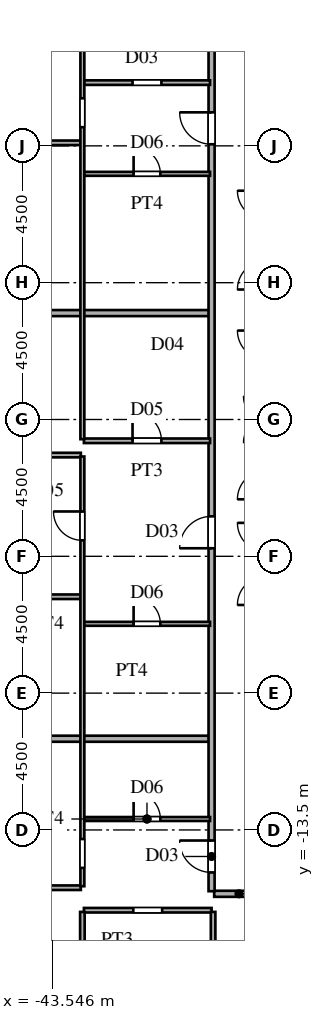
"""IFC4 building model, lengths in metres.
Left out: names, types, materials, properties, quantities, classifications, styles, units other than length and angle.
Written with IfcOpenShell. Run it as: python <this file> out.ifc"""

import sys

from ifc_helpers import new_model, si_unit, direction, frame, frame_2d, origin, place, context, subcontext, project, spatial, rectangle, extrude, source, transform, mapped, element, fill, save


model = new_model("IFC4")
c1 = context("Model", 3, precision=1e-05, world=origin(), true_north=direction((0.0, 1.0)))
c2 = subcontext(c1, "Body", "Model", "MODEL_VIEW")
j1 = project(units=[si_unit("LENGTHUNIT", "METRE"), si_unit("PLANEANGLEUNIT", "RADIAN")], contexts=[c1])
p1 = place(None, origin())
s1 = spatial("IfcSite", under=j1, at=p1, CompositionType="ELEMENT")
p2 = place(p1, origin())
s2 = spatial("IfcBuilding", under=s1, at=p2, CompositionType="ELEMENT")
p3 = place(p2, frame((0.0, 0.0, 103.2)))
s3 = spatial("IfcBuildingStorey", under=s2, at=p3, CompositionType="ELEMENT", Elevation=103.2)
p4 = place(p3, frame((-42.5, -16.14, 0.0), z_axis=(0.0, 0.0, 1.0), x_axis=(1.0, 0.0, 0.0)))
e1 = element("IfcWall", 1, at=p4, inside=s3, PredefinedType="PARTITIONING", context=c2, shape_type="SweptSolid", body=[
    extrude(rectangle(XDim=4.2, YDim=0.15, at=frame_2d((2.1, 0.0))), origin(), (0.0, 0.0, 1.0), 3.38),
])
p5 = place(p4, frame((1.625, 0.0, 0.0)))
e2 = element("IfcOpeningElement", 2, at=p5, cuts=e1, PredefinedType="OPENING", context=c2, shape_type="SweptSolid", body=[
    extrude(rectangle(XDim=0.95, YDim=2.15, at=frame_2d((0.475, 1.075))), frame((0.0, 0.085, 0.0), z_axis=(0.0, -1.0, 0.0), x_axis=(1.0, 0.0, 0.0)), (0.0, 0.0, 1.0), 0.17),
])
p6 = place(p3, frame((-38.215, -15.6, 0.0), z_axis=(0.0, 0.0, 1.0), x_axis=(1.0, 0.0, 0.0)))
e3 = element("IfcWall", 3, at=p6, inside=s3, PredefinedType="PARTITIONING", context=c2, shape_type="SweptSolid", body=[
    extrude(rectangle(XDim=1.63, YDim=0.2, at=frame_2d((0.815, 0.0))), origin(), (0.0, 0.0, 1.0), 3.38),
])
p7 = place(p3, frame((-53.477, -15.4, 0.0), z_axis=(0.0, 0.0, 1.0), x_axis=(1.0, 0.0, 0.0)))
e4 = element("IfcWall", 4, at=p7, inside=s3, PredefinedType="PARTITIONING", context=c2, shape_type="SweptSolid", body=[
    extrude(rectangle(XDim=10.877, YDim=0.15, at=frame_2d((5.438, 0.0))), origin(), (0.0, 0.0, 1.0), 3.38),
])
p8 = place(p7, frame((7.465, 0.0, 0.0)))
e5 = element("IfcOpeningElement", 5, at=p8, cuts=e4, PredefinedType="OPENING", context=c2, shape_type="SweptSolid", body=[
    extrude(rectangle(XDim=0.95, YDim=2.15, at=frame_2d((0.475, 1.075))), frame((0.0, 0.085, 0.0), z_axis=(0.0, -1.0, 0.0), x_axis=(1.0, 0.0, 0.0)), (0.0, 0.0, 1.0), 0.17),
])
p9 = place(p3, frame((-42.5, -13.14, 0.0), z_axis=(0.0, 0.0, 1.0), x_axis=(1.0, 0.0, 0.0)))
e6 = element("IfcWall", 6, at=p9, inside=s3, PredefinedType="PARTITIONING", context=c2, shape_type="SweptSolid", body=[
    extrude(rectangle(XDim=4.15, YDim=0.13, at=frame_2d((2.075, 0.0))), origin(), (0.0, 0.0, 1.0), 3.38),
])
p10 = place(p9, frame((1.635, 0.0, 0.0)))
e7 = element("IfcOpeningElement", 7, at=p10, cuts=e6, PredefinedType="OPENING", context=c2, shape_type="SweptSolid", body=[
    extrude(rectangle(XDim=0.88, YDim=2.1, at=frame_2d((0.44, 1.05))), frame((0.0, 0.075, 0.0), z_axis=(0.0, -1.0, 0.0), x_axis=(1.0, 0.0, 0.0)), (0.0, 0.0, 1.0), 0.15),
])
p11 = place(p3, frame((-64.346, -10.5, 0.0), z_axis=(0.0, 0.0, 1.0), x_axis=(1.0, 0.0, 0.0)))
e8 = element("IfcWall", 8, at=p11, inside=s3, PredefinedType="PARTITIONING", context=c2, shape_type="SweptSolid", body=[
    extrude(rectangle(XDim=25.966, YDim=0.2, at=frame_2d((12.983, 0.0))), origin(), (0.0, 0.0, 1.0), 3.38),
])
p12 = place(p3, frame((-42.5, -6.72, 0.0), z_axis=(0.0, 0.0, 1.0), x_axis=(1.0, 0.0, 0.0)))
e9 = element("IfcWall", 9, at=p12, inside=s3, PredefinedType="PARTITIONING", context=c2, shape_type="SweptSolid", body=[
    extrude(rectangle(XDim=4.15, YDim=0.13, at=frame_2d((2.075, 0.0))), origin(), (0.0, 0.0, 1.0), 3.38),
])
p13 = place(p12, frame((1.635, 0.0, 0.0)))
e10 = element("IfcOpeningElement", 10, at=p13, cuts=e9, PredefinedType="OPENING", context=c2, shape_type="SweptSolid", body=[
    extrude(rectangle(XDim=0.88, YDim=2.1, at=frame_2d((0.44, 1.05))), frame((0.0, 0.075, 0.0), z_axis=(0.0, -1.0, 0.0), x_axis=(1.0, 0.0, 0.0)), (0.0, 0.0, 1.0), 0.15),
])
p14 = place(p3, frame((-71.035, -5.83, 0.0), z_axis=(0.0, 0.0, 1.0), x_axis=(1.0, 0.0, 0.0)))
e11 = element("IfcWall", 11, at=p14, inside=s3, PredefinedType="PARTITIONING", context=c2, shape_type="SweptSolid", body=[
    extrude(rectangle(XDim=28.435, YDim=0.15, at=frame_2d((14.217, 0.0))), origin(), (0.0, 0.0, 1.0), 3.38),
])
p15 = place(p14, frame((22.035, 0.0, 0.0)))
e12 = element("IfcOpeningElement", 12, at=p15, cuts=e11, PredefinedType="OPENING", context=c2, shape_type="SweptSolid", body=[
    extrude(rectangle(XDim=0.95, YDim=2.15, at=frame_2d((0.475, 1.075))), frame((0.0, 0.085, 0.0), z_axis=(0.0, -1.0, 0.0), x_axis=(1.0, 0.0, 0.0)), (0.0, 0.0, 1.0), 0.17),
])
p16 = place(p14, frame((13.21, 0.0, 0.0)))
e13 = element("IfcOpeningElement", 13, at=p16, cuts=e11, PredefinedType="OPENING", context=c2, shape_type="SweptSolid", body=[
    extrude(rectangle(XDim=0.95, YDim=2.15, at=frame_2d((0.475, 1.075))), frame((0.0, 0.085, 0.0), z_axis=(0.0, -1.0, 0.0), x_axis=(1.0, 0.0, 0.0)), (0.0, 0.0, 1.0), 0.17),
])
p17 = place(p3, frame((-71.035, -1.17, 0.0), z_axis=(0.0, 0.0, 1.0), x_axis=(1.0, 0.0, 0.0)))
e14 = element("IfcWall", 14, at=p17, inside=s3, PredefinedType="PARTITIONING", context=c2, shape_type="SweptSolid", body=[
    extrude(rectangle(XDim=28.435, YDim=0.15, at=frame_2d((14.217, 0.0))), origin(), (0.0, 0.0, 1.0), 3.38),
])
p18 = place(p17, frame((22.035, 0.0, 0.0)))
e15 = element("IfcOpeningElement", 15, at=p18, cuts=e14, PredefinedType="OPENING", context=c2, shape_type="SweptSolid", body=[
    extrude(rectangle(XDim=0.95, YDim=2.15, at=frame_2d((0.475, 1.075))), frame((0.0, 0.085, 0.0), z_axis=(0.0, -1.0, 0.0), x_axis=(1.0, 0.0, 0.0)), (0.0, 0.0, 1.0), 0.17),
])
p19 = place(p17, frame((13.21, 0.0, 0.0)))
e16 = element("IfcOpeningElement", 16, at=p19, cuts=e14, PredefinedType="OPENING", context=c2, shape_type="SweptSolid", body=[
    extrude(rectangle(XDim=0.95, YDim=2.15, at=frame_2d((0.475, 1.075))), frame((0.0, 0.085, 0.0), z_axis=(0.0, -1.0, 0.0), x_axis=(1.0, 0.0, 0.0)), (0.0, 0.0, 1.0), 0.17),
])
p20 = place(p3, frame((-42.5, -0.7, 0.0), z_axis=(0.0, 0.0, 1.0), x_axis=(1.0, 0.0, 0.0)))
e17 = element("IfcWall", 17, at=p20, inside=s3, PredefinedType="PARTITIONING", context=c2, shape_type="SweptSolid", body=[
    extrude(rectangle(XDim=4.15, YDim=0.15, at=frame_2d((2.075, 0.0))), origin(), (0.0, 0.0, 1.0), 3.38),
])
p21 = place(p20, frame((1.6, 0.0, 0.0)))
e18 = element("IfcOpeningElement", 18, at=p21, cuts=e17, PredefinedType="OPENING", context=c2, shape_type="SweptSolid", body=[
    extrude(rectangle(XDim=0.95, YDim=2.15, at=frame_2d((0.475, 1.075))), frame((0.0, 0.085, 0.0), z_axis=(0.0, -1.0, 0.0), x_axis=(1.0, 0.0, 0.0)), (0.0, 0.0, 1.0), 0.17),
])
p22 = place(p3, frame((-71.005, 3.5, 0.0), z_axis=(0.0, 0.0, 1.0), x_axis=(1.0, 0.0, 0.0)))
e19 = element("IfcWall", 19, at=p22, inside=s3, PredefinedType="PARTITIONING", context=c2, shape_type="SweptSolid", body=[
    extrude(rectangle(XDim=32.625, YDim=0.2, at=frame_2d((16.312, 0.0))), origin(), (0.0, 0.0, 1.0), 3.38),
])
p23 = place(p3, frame((-42.5, 8.08, 0.0), z_axis=(0.0, 0.0, 1.0), x_axis=(1.0, 0.0, 0.0)))
e20 = element("IfcWall", 20, at=p23, inside=s3, PredefinedType="PARTITIONING", context=c2, shape_type="SweptSolid", body=[
    extrude(rectangle(XDim=4.15, YDim=0.13, at=frame_2d((2.075, 0.0))), origin(), (0.0, 0.0, 1.0), 3.38),
])
p24 = place(p23, frame((1.635, 0.0, 0.0)))
e21 = element("IfcOpeningElement", 21, at=p24, cuts=e20, PredefinedType="OPENING", context=c2, shape_type="SweptSolid", body=[
    extrude(rectangle(XDim=0.88, YDim=2.1, at=frame_2d((0.44, 1.05))), frame((0.0, 0.075, 0.0), z_axis=(0.0, -1.0, 0.0), x_axis=(1.0, 0.0, 0.0)), (0.0, 0.0, 1.0), 0.15),
])
p25 = place(p3, frame((-67.478, 9.1, 0.0), z_axis=(0.0, 0.0, 1.0), x_axis=(1.0, 0.0, 0.0)))
e22 = element("IfcWall", 22, at=p25, inside=s3, PredefinedType="PARTITIONING", context=c2, shape_type="SweptSolid", body=[
    extrude(rectangle(XDim=24.878, YDim=0.15, at=frame_2d((12.439, 0.0))), origin(), (0.0, 0.0, 1.0), 3.38),
])
p26 = place(p25, frame((21.466, 0.0, 0.0)))
e23 = element("IfcOpeningElement", 23, at=p26, cuts=e22, PredefinedType="OPENING", context=c2, shape_type="SweptSolid", body=[
    extrude(rectangle(XDim=0.95, YDim=2.15, at=frame_2d((0.475, 1.075))), frame((0.0, 0.085, 0.0), z_axis=(0.0, -1.0, 0.0), x_axis=(1.0, 0.0, 0.0)), (0.0, 0.0, 1.0), 0.17),
])
p27 = place(p3, frame((-42.5, 11.08, 0.0), z_axis=(0.0, 0.0, 1.0), x_axis=(1.0, 0.0, 0.0)))
e24 = element("IfcWall", 24, at=p27, inside=s3, PredefinedType="PARTITIONING", context=c2, shape_type="SweptSolid", body=[
    extrude(rectangle(XDim=4.15, YDim=0.15, at=frame_2d((2.075, 0.0))), origin(), (0.0, 0.0, 1.0), 3.38),
])
p28 = place(p27, frame((1.6, 0.0, 0.0)))
e25 = element("IfcOpeningElement", 25, at=p28, cuts=e24, PredefinedType="OPENING", context=c2, shape_type="SweptSolid", body=[
    extrude(rectangle(XDim=0.95, YDim=2.15, at=frame_2d((0.475, 1.075))), frame((0.0, 0.085, 0.0), z_axis=(0.0, -1.0, 0.0), x_axis=(1.0, 0.0, 0.0)), (0.0, 0.0, 1.0), 0.17),
])
p29 = place(p3, frame((-42.55, -20.337, 0.0), z_axis=(0.0, 0.0, 1.0), x_axis=(0.0, 1.0, 0.0)))
e26 = element("IfcWall", 26, at=p29, inside=s3, PredefinedType="PARTITIONING", context=c2, shape_type="SweptSolid", body=[
    extrude(rectangle(XDim=4.142, YDim=0.15, at=frame_2d((2.071, 0.0))), origin(), (0.0, 0.0, 1.0), 3.38),
])
p30 = place(p3, frame((-42.55, -15.351, 0.0), z_axis=(0.0, 0.0, 1.0), x_axis=(0.0, 1.0, 0.0)))
e27 = element("IfcWall", 27, at=p30, inside=s3, PredefinedType="PARTITIONING", context=c2, shape_type="SweptSolid", body=[
    extrude(rectangle(XDim=14.134, YDim=0.13, at=frame_2d((7.067, 0.0))), origin(), (0.0, 0.0, 1.0), 3.38),
])
p31 = place(p30, frame((0.603, 0.0, 0.0)))
e28 = element("IfcOpeningElement", 28, at=p31, cuts=e27, PredefinedType="OPENING", context=c2, shape_type="SweptSolid", body=[
    extrude(rectangle(XDim=0.95, YDim=2.15, at=frame_2d((0.475, 1.075))), frame((0.0, 0.075, 0.0), z_axis=(0.0, -1.0, 0.0), x_axis=(1.0, 0.0, 0.0)), (0.0, 0.0, 1.0), 0.15),
])
p32 = place(p30, frame((11.376, 0.0, 0.0)))
e29 = element("IfcOpeningElement", 29, at=p32, cuts=e27, PredefinedType="OPENING", context=c2, shape_type="SweptSolid", body=[
    extrude(rectangle(XDim=0.95, YDim=2.15, at=frame_2d((0.475, 1.075))), frame((0.0, 0.075, 0.0), z_axis=(0.0, -1.0, 0.0), x_axis=(1.0, 0.0, 0.0)), (0.0, 0.0, 1.0), 0.15),
])
p33 = place(p3, frame((-42.55, -0.648, 0.0), z_axis=(0.0, 0.0, 1.0), x_axis=(0.0, 1.0, 0.0)))
e30 = element("IfcWall", 30, at=p33, inside=s3, PredefinedType="PARTITIONING", context=c2, shape_type="SweptSolid", body=[
    extrude(rectangle(XDim=20.985, YDim=0.13, at=frame_2d((10.492, 0.0))), origin(), (0.0, 0.0, 1.0), 3.38),
])
p34 = place(p33, frame((10.262, 0.0, 0.0)))
e31 = element("IfcOpeningElement", 31, at=p34, cuts=e30, PredefinedType="OPENING", context=c2, shape_type="SweptSolid", body=[
    extrude(rectangle(XDim=0.95, YDim=2.15, at=frame_2d((0.475, 1.075))), frame((0.0, 0.075, 0.0), z_axis=(0.0, -1.0, 0.0), x_axis=(1.0, 0.0, 0.0)), (0.0, 0.0, 1.0), 0.15),
])
p35 = place(p33, frame((18.653, 0.0, 0.0)))
e32 = element("IfcOpeningElement", 32, at=p35, cuts=e30, PredefinedType="OPENING", context=c2, shape_type="SweptSolid", body=[
    extrude(rectangle(XDim=0.95, YDim=2.15, at=frame_2d((0.475, 1.075))), frame((0.0, 0.075, 0.0), z_axis=(0.0, -1.0, 0.0), x_axis=(1.0, 0.0, 0.0)), (0.0, 0.0, 1.0), 0.15),
])
p36 = place(p3, frame((-38.3, -15.515, 0.0), z_axis=(0.0, 0.0, 1.0), x_axis=(0.0, 1.0, 0.0)))
e33 = element("IfcWall", 33, at=p36, inside=s3, PredefinedType="PARTITIONING", context=c2, shape_type="SweptSolid", body=[
    extrude(rectangle(XDim=31.03, YDim=0.2, at=frame_2d((15.515, 0.0))), origin(), (0.0, 0.0, 1.0), 3.38),
])
p37 = place(p36, frame((0.617, 0.0, 0.0)))
e34 = element("IfcOpeningElement", 34, at=p37, cuts=e33, PredefinedType="OPENING", context=c2, shape_type="SweptSolid", body=[
    extrude(rectangle(XDim=1.05, YDim=2.25, at=frame_2d((0.525, 1.125))), frame((0.0, 0.11, 0.0), z_axis=(0.0, -1.0, 0.0), x_axis=(1.0, 0.0, 0.0)), (0.0, 0.0, 1.0), 0.22),
])
p38 = place(p36, frame((11.28, 0.0, 0.0)))
e35 = element("IfcOpeningElement", 35, at=p38, cuts=e33, PredefinedType="OPENING", context=c2, shape_type="SweptSolid", body=[
    extrude(rectangle(XDim=1.05, YDim=2.25, at=frame_2d((0.525, 1.125))), frame((0.0, 0.11, 0.0), z_axis=(0.0, -1.0, 0.0), x_axis=(1.0, 0.0, 0.0)), (0.0, 0.0, 1.0), 0.22),
])
p39 = place(p36, frame((24.567, 0.0, 0.0)))
e36 = element("IfcOpeningElement", 36, at=p39, cuts=e33, PredefinedType="OPENING", context=c2, shape_type="SweptSolid", body=[
    extrude(rectangle(XDim=1.05, YDim=2.25, at=frame_2d((0.525, 1.125))), frame((0.0, 0.11, 0.0), z_axis=(0.0, -1.0, 0.0), x_axis=(1.0, 0.0, 0.0)), (0.0, 0.0, 1.0), 0.22),
])
p40 = place(p3, frame((-38.25, -22.273, 0.0), z_axis=(0.0, 0.0, 1.0), x_axis=(0.0, 1.0, 0.0)))
e37 = element("IfcWall", 37, at=p40, inside=s3, PredefinedType="PARTITIONING", context=c2, shape_type="SweptSolid", body=[
    extrude(rectangle(XDim=6.078, YDim=0.15, at=frame_2d((3.039, 0.0))), origin(), (0.0, 0.0, 1.0), 3.38),
])
p41 = place(p40, frame((0.929, 0.0, 0.0)))
e38 = element("IfcOpeningElement", 38, at=p41, cuts=e37, PredefinedType="OPENING", context=c2, shape_type="SweptSolid", body=[
    extrude(rectangle(XDim=0.95, YDim=2.15, at=frame_2d((0.475, 1.075))), frame((0.0, 0.085, 0.0), z_axis=(0.0, -1.0, 0.0), x_axis=(1.0, 0.0, 0.0)), (0.0, 0.0, 1.0), 0.17),
])
p42 = place(p40, frame((3.976, 0.0, 0.0)))
e39 = element("IfcOpeningElement", 39, at=p42, cuts=e37, PredefinedType="OPENING", context=c2, shape_type="SweptSolid", body=[
    extrude(rectangle(XDim=0.95, YDim=2.15, at=frame_2d((0.475, 1.075))), frame((0.0, 0.085, 0.0), z_axis=(0.0, -1.0, 0.0), x_axis=(1.0, 0.0, 0.0)), (0.0, 0.0, 1.0), 0.17),
])
m1 = source(origin(), c2, "Body", "SweptSolid", [
    extrude(rectangle(XDim=0.88, YDim=2.1, at=frame_2d((0.44, 1.05))), frame((0.0, 0.025, 0.0), z_axis=(0.0, -1.0, 0.0), x_axis=(1.0, 0.0, 0.0)), (0.0, 0.0, 1.0), 0.05),
])
p43 = place(p10, origin())
e40 = element("IfcDoor", 40, at=p43, inside=s3, OperationType="SINGLE_SWING_LEFT", PredefinedType="DOOR", context=c2, shape_type="MappedRepresentation", body=[
    mapped(m1, transform((0.0, 0.0, 0.0), scale=1.0)),
])
fill(e7, e40)
p44 = place(p13, origin())
e41 = element("IfcDoor", 41, at=p44, inside=s3, OperationType="SINGLE_SWING_LEFT", PredefinedType="DOOR", context=c2, shape_type="MappedRepresentation", body=[
    mapped(m1, transform((0.0, 0.0, 0.0), scale=1.0)),
])
fill(e10, e41)
m2 = source(origin(), c2, "Body", "SweptSolid", [
    extrude(rectangle(XDim=0.95, YDim=2.15, at=frame_2d((0.475, 1.075))), frame((0.0, 0.025, 0.0), z_axis=(0.0, -1.0, 0.0), x_axis=(1.0, 0.0, 0.0)), (0.0, 0.0, 1.0), 0.05),
])
p45 = place(p21, origin())
e42 = element("IfcDoor", 42, at=p45, inside=s3, OperationType="SINGLE_SWING_LEFT", PredefinedType="DOOR", context=c2, shape_type="MappedRepresentation", body=[
    mapped(m2, transform((0.0, 0.0, 0.0), scale=1.0)),
])
fill(e18, e42)
p46 = place(p24, origin())
e43 = element("IfcDoor", 43, at=p46, inside=s3, OperationType="SINGLE_SWING_LEFT", PredefinedType="DOOR", context=c2, shape_type="MappedRepresentation", body=[
    mapped(m1, transform((0.0, 0.0, 0.0), scale=1.0)),
])
fill(e21, e43)
p47 = place(p32, origin())
e44 = element("IfcDoor", 44, at=p47, inside=s3, OperationType="SINGLE_SWING_RIGHT", PredefinedType="DOOR", context=c2, shape_type="MappedRepresentation", body=[
    mapped(m2, transform((0.0, 0.0, 0.0), scale=1.0)),
])
fill(e29, e44)
m3 = source(origin(), c2, "Body", "SweptSolid", [
    extrude(rectangle(XDim=1.05, YDim=2.25, at=frame_2d((0.525, 1.125))), frame((0.0, 0.025, 0.0), z_axis=(0.0, -1.0, 0.0), x_axis=(1.0, 0.0, 0.0)), (0.0, 0.0, 1.0), 0.05),
])
p48 = place(p37, origin())
e45 = element("IfcDoor", 45, at=p48, inside=s3, OperationType="SINGLE_SWING_RIGHT", PredefinedType="DOOR", context=c2, shape_type="MappedRepresentation", body=[
    mapped(m3, transform((0.0, 0.0, 0.0), scale=1.0)),
])
fill(e34, e45)
p49 = place(p38, origin())
e46 = element("IfcDoor", 46, at=p49, inside=s3, OperationType="SINGLE_SWING_LEFT", PredefinedType="DOOR", context=c2, shape_type="MappedRepresentation", body=[
    mapped(m3, transform((0.0, 0.0, 0.0), scale=1.0)),
])
fill(e35, e46)
p50 = place(p39, origin())
e47 = element("IfcDoor", 47, at=p50, inside=s3, OperationType="SINGLE_SWING_RIGHT", PredefinedType="DOOR", context=c2, shape_type="MappedRepresentation", body=[
    mapped(m3, transform((0.0, 0.0, 0.0), scale=1.0)),
])
fill(e36, e47)
save(model, sys.argv[1])
